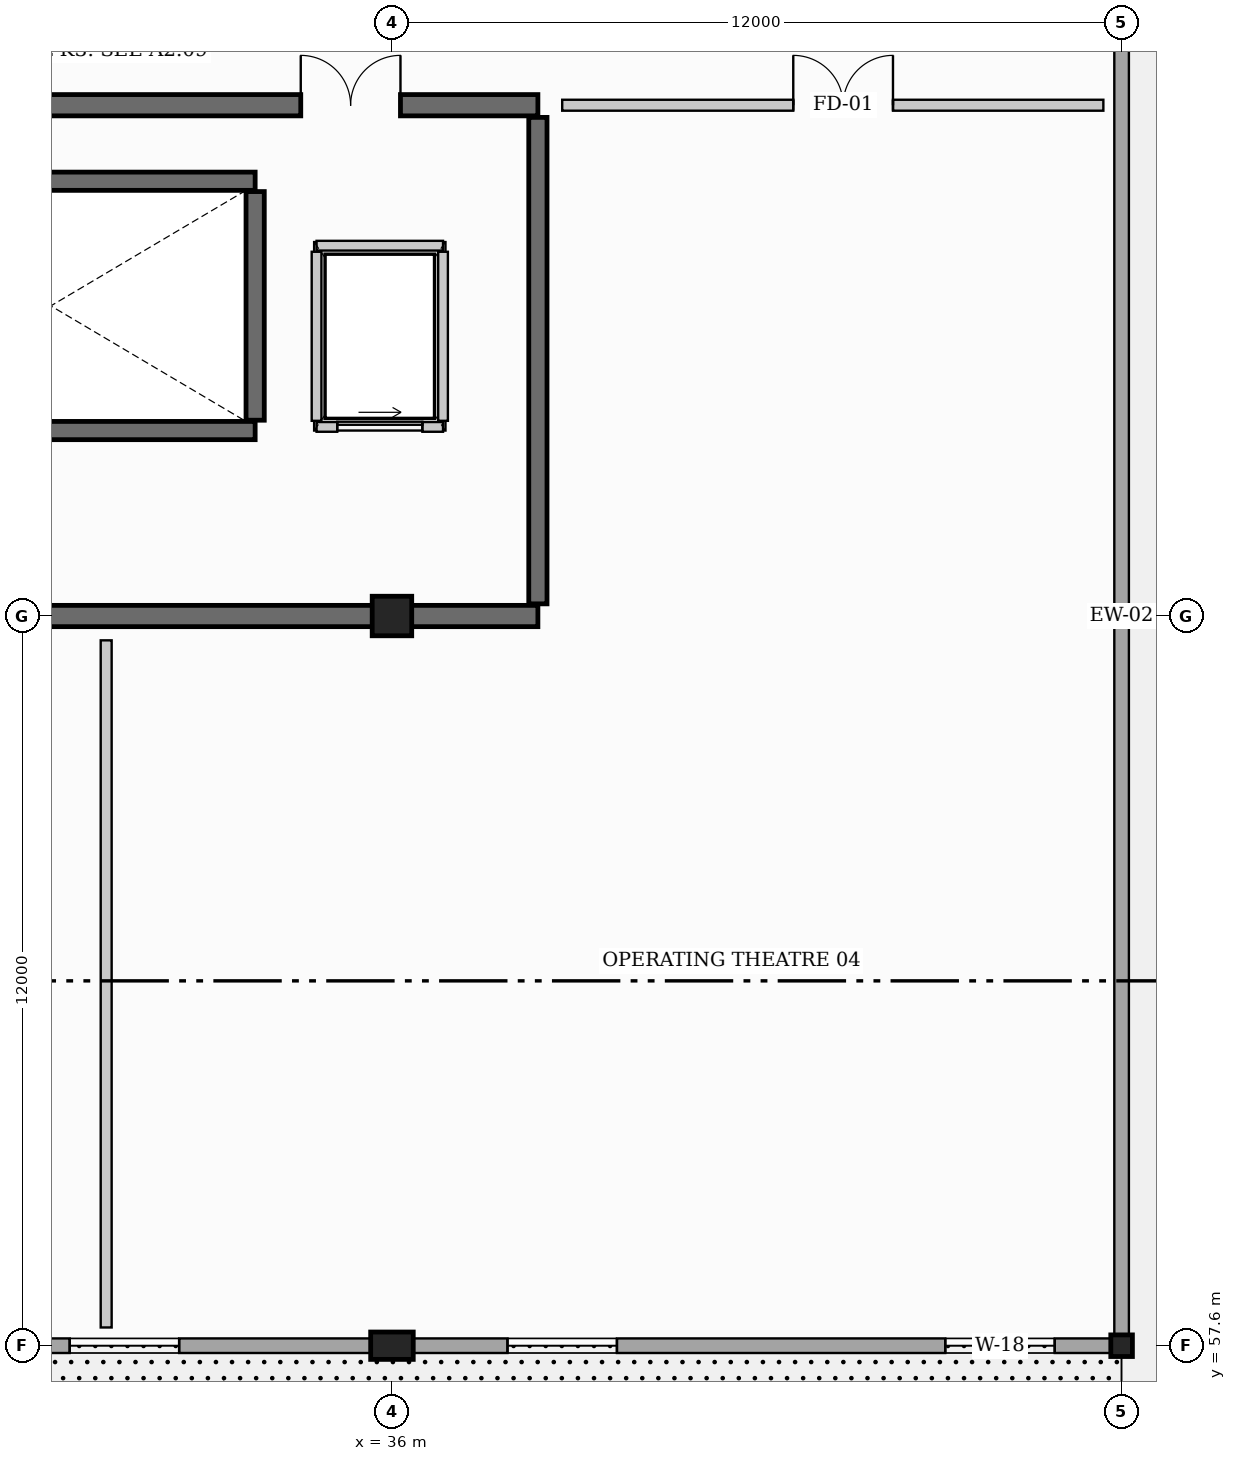
"""IFC4 building model, lengths in metres.
Left out: names, types, materials, properties, quantities, classifications, styles, units other than length and angle.
Written with IfcOpenShell. Run it as: python <this file> out.ifc"""

import sys

from ifc_helpers import new_model, si_unit, direction, frame, frame_2d, origin, origin_2d, place, context, subcontext, project, spatial, rectangle, hollow_circle, extrude, element, fill, save


model = new_model("IFC4")
c1 = context("Model", 3, precision=1e-05, world=origin(), true_north=direction((0.0, 1.0)))
c2 = subcontext(c1, "Body", "Model", "MODEL_VIEW")
j1 = project(units=[si_unit("LENGTHUNIT", "METRE"), si_unit("PLANEANGLEUNIT", "RADIAN")], contexts=[c1])
p1 = place(None, origin())
s1 = spatial("IfcSite", under=j1, at=p1, CompositionType="ELEMENT")
p2 = place(p1, origin())
s2 = spatial("IfcBuilding", under=s1, at=p2, CompositionType="ELEMENT")
p3 = place(p2, frame((0.0, 0.0, 9.6)))
s3 = spatial("IfcBuildingStorey", under=s2, at=p3, CompositionType="ELEMENT", Elevation=9.6)
p4 = place(p3, frame((36.0, 57.6, 0.0), z_axis=(0.0, 0.0, 1.0), x_axis=(0.0, 1.0, 0.0)))
e1 = element("IfcColumn", 1, at=p4, inside=s3, PredefinedType="PILASTER", context=c2, shape_type="SweptSolid", body=[
    extrude(rectangle(XDim=0.45, YDim=0.7, at=origin_2d()), origin(), (0.0, 0.0, 1.0), 4.8),
])
p5 = place(p3, frame((36.0, 69.6, 0.0), z_axis=(0.0, 0.0, 1.0), x_axis=(0.0, 1.0, 0.0)))
e2 = element("IfcColumn", 2, at=p5, inside=s3, PredefinedType="COLUMN", context=c2, shape_type="SweptSolid", body=[
    extrude(rectangle(XDim=0.65, YDim=0.65, at=origin_2d()), origin(), (0.0, 0.0, 1.0), 4.8),
])
p6 = place(p3, frame((48.0, 57.6, 0.0), z_axis=(0.0, 0.0, 1.0), x_axis=(1.0, 0.0, 0.0)))
e3 = element("IfcColumn", 3, at=p6, inside=s3, PredefinedType="COLUMN", context=c2, shape_type="SweptSolid", body=[
    extrude(hollow_circle(Radius=0.178, WallThickness=0.013, at=origin_2d()), origin(), (0.0, 0.0, 1.0), 4.8),
])
p7 = place(p3, frame((48.0, 69.6, 0.0), z_axis=(0.0, 0.0, 1.0), x_axis=(1.0, 0.0, 0.0)))
e4 = element("IfcColumn", 4, at=p7, inside=s3, PredefinedType="COLUMN", context=c2, shape_type="SweptSolid", body=[
    extrude(hollow_circle(Radius=0.136, WallThickness=0.013, at=origin_2d()), origin(), (0.0, 0.0, 1.0), 4.8),
])
p8 = place(p3, frame((24.0, 78.0, 0.0), z_axis=(0.0, 0.0, 1.0), x_axis=(1.0, 0.0, 0.0)))
e5 = element("IfcWall", 5, at=p8, inside=s3, PredefinedType="SHEAR", context=c2, shape_type="SweptSolid", body=[
    extrude(rectangle(XDim=14.4, YDim=0.35, at=frame_2d((7.2, 0.0))), origin(), (0.0, 0.0, 1.0), 4.8),
])
p9 = place(p8, frame((10.5, 0.0, 0.0)))
e6 = element("IfcOpeningElement", 6, at=p9, cuts=e5, PredefinedType="OPENING", context=c2, shape_type="SweptSolid", body=[
    extrude(rectangle(XDim=1.64, YDim=2.2, at=frame_2d((0.82, 1.1))), frame((0.0, 0.185, 0.0), z_axis=(0.0, -1.0, 0.0), x_axis=(1.0, 0.0, 0.0)), (0.0, 0.0, 1.0), 0.37),
])
p10 = place(p3, frame((38.4, 69.6, 0.0), z_axis=(0.0, 0.0, 1.0), x_axis=(-1.0, 0.0, 0.0)))
e7 = element("IfcWall", 7, at=p10, inside=s3, PredefinedType="SHEAR", context=c2, shape_type="SweptSolid", body=[
    extrude(rectangle(XDim=14.4, YDim=0.35, at=frame_2d((7.2, 0.0))), origin(), (0.0, 0.0, 1.0), 4.8),
])
p11 = place(p3, frame((38.4, 77.8, 0.0), z_axis=(0.0, 0.0, 1.0), x_axis=(0.0, -1.0, 0.0)))
e8 = element("IfcWall", 8, at=p11, inside=s3, PredefinedType="SHEAR", context=c2, shape_type="SweptSolid", body=[
    extrude(rectangle(XDim=8.0, YDim=0.3, at=frame_2d((4.0, 0.0))), origin(), (0.0, 0.0, 1.0), 4.8),
])
p12 = place(p3, frame((25.05, 72.65, 0.0), z_axis=(0.0, 0.0, 1.0), x_axis=(1.0, 0.0, 0.0)))
e9 = element("IfcWall", 9, at=p12, inside=s3, PredefinedType="SHEAR", context=c2, shape_type="SweptSolid", body=[
    extrude(rectangle(XDim=8.7, YDim=0.3, at=frame_2d((4.35, 0.0))), origin(), (0.0, 0.0, 1.0), 4.8),
])
p13 = place(p12, frame((0.35, 0.0, 0.0)))
e10 = element("IfcOpeningElement", 10, at=p13, cuts=e9, PredefinedType="OPENING", context=c2, shape_type="SweptSolid", body=[
    extrude(rectangle(XDim=1.1, YDim=2.15, at=frame_2d((0.55, 1.075))), frame((0.0, 0.16, 0.0), z_axis=(0.0, -1.0, 0.0), x_axis=(1.0, 0.0, 0.0)), (0.0, 0.0, 1.0), 0.32),
])
p14 = place(p3, frame((33.75, 76.75, 0.0), z_axis=(0.0, 0.0, 1.0), x_axis=(-1.0, 0.0, 0.0)))
e11 = element("IfcWall", 11, at=p14, inside=s3, PredefinedType="SHEAR", context=c2, shape_type="SweptSolid", body=[
    extrude(rectangle(XDim=8.7, YDim=0.3, at=frame_2d((4.35, 0.0))), origin(), (0.0, 0.0, 1.0), 4.8),
])
p15 = place(p3, frame((33.75, 72.82, 0.0), z_axis=(0.0, 0.0, 1.0), x_axis=(0.0, 1.0, 0.0)))
e12 = element("IfcWall", 12, at=p15, inside=s3, PredefinedType="SHEAR", context=c2, shape_type="SweptSolid", body=[
    extrude(rectangle(XDim=3.76, YDim=0.3, at=frame_2d((1.88, 0.0))), origin(), (0.0, 0.0, 1.0), 4.8),
])
p16 = place(p3, frame((48.0, 57.6, 0.0), z_axis=(0.0, 0.0, 1.0), x_axis=(-1.0, 0.0, 0.0)))
e13 = element("IfcWall", 13, at=p16, inside=s3, PredefinedType="STANDARD", context=c2, shape_type="SweptSolid", body=[
    extrude(rectangle(XDim=48.0, YDim=0.24, at=frame_2d((24.0, 0.0))), origin(), (0.0, 0.0, 1.0), 3.465),
])
p17 = place(p16, frame((39.0, 0.0, 0.0)))
e14 = element("IfcOpeningElement", 14, at=p17, cuts=e13, PredefinedType="OPENING", context=c2, shape_type="SweptSolid", body=[
    extrude(rectangle(XDim=2.02, YDim=2.2, at=frame_2d((1.01, 1.1))), frame((0.0, 0.13, 0.0), z_axis=(0.0, -1.0, 0.0), x_axis=(1.0, 0.0, 0.0)), (0.0, 0.0, 1.0), 0.26),
])
p18 = place(p16, frame((1.1, 0.0, 2.1)))
e15 = element("IfcOpeningElement", 15, at=p18, cuts=e13, PredefinedType="OPENING", context=c2, shape_type="SweptSolid", body=[
    extrude(rectangle(XDim=1.8, YDim=0.9, at=frame_2d((0.9, 0.45))), frame((0.0, 0.13, 0.0), z_axis=(0.0, -1.0, 0.0), x_axis=(1.0, 0.0, 0.0)), (0.0, 0.0, 1.0), 0.26),
])
p19 = place(p16, frame((8.3, 0.0, 2.1)))
e16 = element("IfcOpeningElement", 16, at=p19, cuts=e13, PredefinedType="OPENING", context=c2, shape_type="SweptSolid", body=[
    extrude(rectangle(XDim=1.8, YDim=0.9, at=frame_2d((0.9, 0.45))), frame((0.0, 0.13, 0.0), z_axis=(0.0, -1.0, 0.0), x_axis=(1.0, 0.0, 0.0)), (0.0, 0.0, 1.0), 0.26),
])
p20 = place(p16, frame((15.5, 0.0, 2.1)))
e17 = element("IfcOpeningElement", 17, at=p20, cuts=e13, PredefinedType="OPENING", context=c2, shape_type="SweptSolid", body=[
    extrude(rectangle(XDim=1.8, YDim=0.9, at=frame_2d((0.9, 0.45))), frame((0.0, 0.13, 0.0), z_axis=(0.0, -1.0, 0.0), x_axis=(1.0, 0.0, 0.0)), (0.0, 0.0, 1.0), 0.26),
])
p21 = place(p16, frame((19.1, 0.0, 2.1)))
e18 = element("IfcOpeningElement", 18, at=p21, cuts=e13, PredefinedType="OPENING", context=c2, shape_type="SweptSolid", body=[
    extrude(rectangle(XDim=1.8, YDim=0.9, at=frame_2d((0.9, 0.45))), frame((0.0, 0.13, 0.0), z_axis=(0.0, -1.0, 0.0), x_axis=(1.0, 0.0, 0.0)), (0.0, 0.0, 1.0), 0.26),
])
p22 = place(p16, frame((26.3, 0.0, 2.1)))
e19 = element("IfcOpeningElement", 19, at=p22, cuts=e13, PredefinedType="OPENING", context=c2, shape_type="SweptSolid", body=[
    extrude(rectangle(XDim=1.8, YDim=0.9, at=frame_2d((0.9, 0.45))), frame((0.0, 0.13, 0.0), z_axis=(0.0, -1.0, 0.0), x_axis=(1.0, 0.0, 0.0)), (0.0, 0.0, 1.0), 0.26),
])
p23 = place(p16, frame((44.3, 0.0, 2.1)))
e20 = element("IfcOpeningElement", 20, at=p23, cuts=e13, PredefinedType="OPENING", context=c2, shape_type="SweptSolid", body=[
    extrude(rectangle(XDim=1.8, YDim=0.9, at=frame_2d((0.9, 0.45))), frame((0.0, 0.13, 0.0), z_axis=(0.0, -1.0, 0.0), x_axis=(1.0, 0.0, 0.0)), (0.0, 0.0, 1.0), 0.26),
])
p24 = place(p3, frame((48.0, 81.6, 0.0), z_axis=(0.0, 0.0, 1.0), x_axis=(0.0, -1.0, 0.0)))
e21 = element("IfcWall", 21, at=p24, inside=s3, PredefinedType="STANDARD", context=c2, shape_type="SweptSolid", body=[
    extrude(rectangle(XDim=24.0, YDim=0.24, at=frame_2d((12.0, 0.0))), origin(), (0.0, 0.0, 1.0), 3.665),
])
p25 = place(p3, frame((34.76, 72.71, 0.0), z_axis=(0.0, 0.0, 1.0), x_axis=(1.0, 0.0, 0.0)))
e22 = element("IfcWall", 22, at=p25, inside=s3, PredefinedType="PARTITIONING", context=c2, shape_type="SweptSolid", body=[
    extrude(rectangle(XDim=2.08, YDim=0.16, at=frame_2d((1.04, 0.0))), origin(), (0.0, 0.0, 1.0), 4.43),
])
p26 = place(p25, frame((0.34, 0.0, 0.0)))
e23 = element("IfcOpeningElement", 23, at=p26, cuts=e22, PredefinedType="OPENING", context=c2, shape_type="SweptSolid", body=[
    extrude(rectangle(XDim=1.4, YDim=2.2, at=frame_2d((0.7, 1.1))), frame((0.0, 0.09, 0.0), z_axis=(0.0, -1.0, 0.0), x_axis=(1.0, 0.0, 0.0)), (0.0, 0.0, 1.0), 0.18),
])
p27 = place(p3, frame((36.84, 75.69, 0.0), z_axis=(0.0, 0.0, 1.0), x_axis=(-1.0, 0.0, 0.0)))
e24 = element("IfcWall", 24, at=p27, inside=s3, PredefinedType="PARTITIONING", context=c2, shape_type="SweptSolid", body=[
    extrude(rectangle(XDim=2.08, YDim=0.16, at=frame_2d((1.04, 0.0))), origin(), (0.0, 0.0, 1.0), 4.43),
])
for number, where, z_axis, x_axis in (
    (25, (34.76, 75.59, 0.0), (0.0, 0.0, 1.0), (0.0, -1.0, 0.0)),
    (26, (36.84, 72.81, 0.0), (0.0, 0.0, 1.0), (0.0, 1.0, 0.0)),
):
    element("IfcWall", number, at=place(p3, frame(where, z_axis=z_axis, x_axis=x_axis)), inside=s3, PredefinedType="PARTITIONING", context=c2, shape_type="SweptSolid", body=[
        extrude(rectangle(XDim=2.78, YDim=0.16, at=frame_2d((1.39, 0.0))), origin(), (0.0, 0.0, 1.0), 4.43),
    ])
p28 = place(p3, frame((31.3, 57.9, 0.0), z_axis=(0.0, 0.0, 1.0), x_axis=(0.0, 1.0, 0.0)))
e27 = element("IfcWall", 27, at=p28, inside=s3, PredefinedType="PARTITIONING", context=c2, shape_type="SweptSolid", body=[
    extrude(rectangle(XDim=11.3, YDim=0.18, at=frame_2d((5.65, 0.0))), origin(), (0.0, 0.0, 1.0), 3.955),
])
p29 = place(p3, frame((38.8, 78.0, 0.0), z_axis=(0.0, 0.0, 1.0), x_axis=(1.0, 0.0, 0.0)))
e28 = element("IfcWall", 28, at=p29, inside=s3, PredefinedType="PARTITIONING", context=c2, shape_type="SweptSolid", body=[
    extrude(rectangle(XDim=8.9, YDim=0.18, at=frame_2d((4.45, 0.0))), origin(), (0.0, 0.0, 1.0), 4.135),
])
p30 = place(p29, frame((3.8, 0.0, 0.0)))
e29 = element("IfcOpeningElement", 29, at=p30, cuts=e28, PredefinedType="OPENING", context=c2, shape_type="SweptSolid", body=[
    extrude(rectangle(XDim=1.64, YDim=2.2, at=frame_2d((0.82, 1.1))), frame((0.0, 0.1, 0.0), z_axis=(0.0, -1.0, 0.0), x_axis=(1.0, 0.0, 0.0)), (0.0, 0.0, 1.0), 0.2),
])
p31 = place(p18, origin())
e30 = element("IfcWindow", 30, at=p31, inside=s3, PartitioningType="DOUBLE_PANEL_HORIZONTAL", PredefinedType="WINDOW", context=c2, shape_type="SweptSolid", body=[
    extrude(rectangle(XDim=1.8, YDim=0.9, at=frame_2d((0.9, 0.45))), frame((0.0, 0.03, 0.0), z_axis=(0.0, -1.0, 0.0), x_axis=(1.0, 0.0, 0.0)), (0.0, 0.0, 1.0), 0.06),
])
fill(e15, e30)
p32 = place(p19, origin())
e31 = element("IfcWindow", 31, at=p32, inside=s3, PartitioningType="DOUBLE_PANEL_HORIZONTAL", PredefinedType="WINDOW", context=c2, shape_type="SweptSolid", body=[
    extrude(rectangle(XDim=1.8, YDim=0.9, at=frame_2d((0.9, 0.45))), frame((0.0, 0.03, 0.0), z_axis=(0.0, -1.0, 0.0), x_axis=(1.0, 0.0, 0.0)), (0.0, 0.0, 1.0), 0.06),
])
fill(e16, e31)
p33 = place(p20, origin())
e32 = element("IfcWindow", 32, at=p33, inside=s3, PartitioningType="DOUBLE_PANEL_HORIZONTAL", PredefinedType="WINDOW", context=c2, shape_type="SweptSolid", body=[
    extrude(rectangle(XDim=1.8, YDim=0.9, at=frame_2d((0.9, 0.45))), frame((0.0, 0.03, 0.0), z_axis=(0.0, -1.0, 0.0), x_axis=(1.0, 0.0, 0.0)), (0.0, 0.0, 1.0), 0.06),
])
fill(e17, e32)
p34 = place(p26, origin())
e33 = element("IfcDoor", 33, at=p34, inside=s3, OperationType="SLIDING_TO_RIGHT", PredefinedType="DOOR", context=c2, shape_type="SweptSolid", body=[
    extrude(rectangle(XDim=1.4, YDim=2.2, at=frame_2d((0.7, 1.1))), frame((0.0, 0.025, 0.0), z_axis=(0.0, -1.0, 0.0), x_axis=(1.0, 0.0, 0.0)), (0.0, 0.0, 1.0), 0.05),
])
fill(e23, e33)
p35 = place(p9, origin())
e34 = element("IfcDoor", 34, at=p35, inside=s3, OperationType="DOUBLE_DOOR_SINGLE_SWING", PredefinedType="DOOR", context=c2, shape_type="SweptSolid", body=[
    extrude(rectangle(XDim=1.64, YDim=2.2, at=frame_2d((0.82, 1.1))), frame((0.0, 0.025, 0.0), z_axis=(0.0, -1.0, 0.0), x_axis=(1.0, 0.0, 0.0)), (0.0, 0.0, 1.0), 0.05),
])
fill(e6, e34)
p36 = place(p30, origin())
e35 = element("IfcDoor", 35, at=p36, inside=s3, OperationType="DOUBLE_DOOR_SINGLE_SWING", PredefinedType="DOOR", context=c2, shape_type="SweptSolid", body=[
    extrude(rectangle(XDim=1.64, YDim=2.2, at=frame_2d((0.82, 1.1))), frame((0.0, 0.025, 0.0), z_axis=(0.0, -1.0, 0.0), x_axis=(1.0, 0.0, 0.0)), (0.0, 0.0, 1.0), 0.05),
])
fill(e29, e35)
save(model, sys.argv[1])
